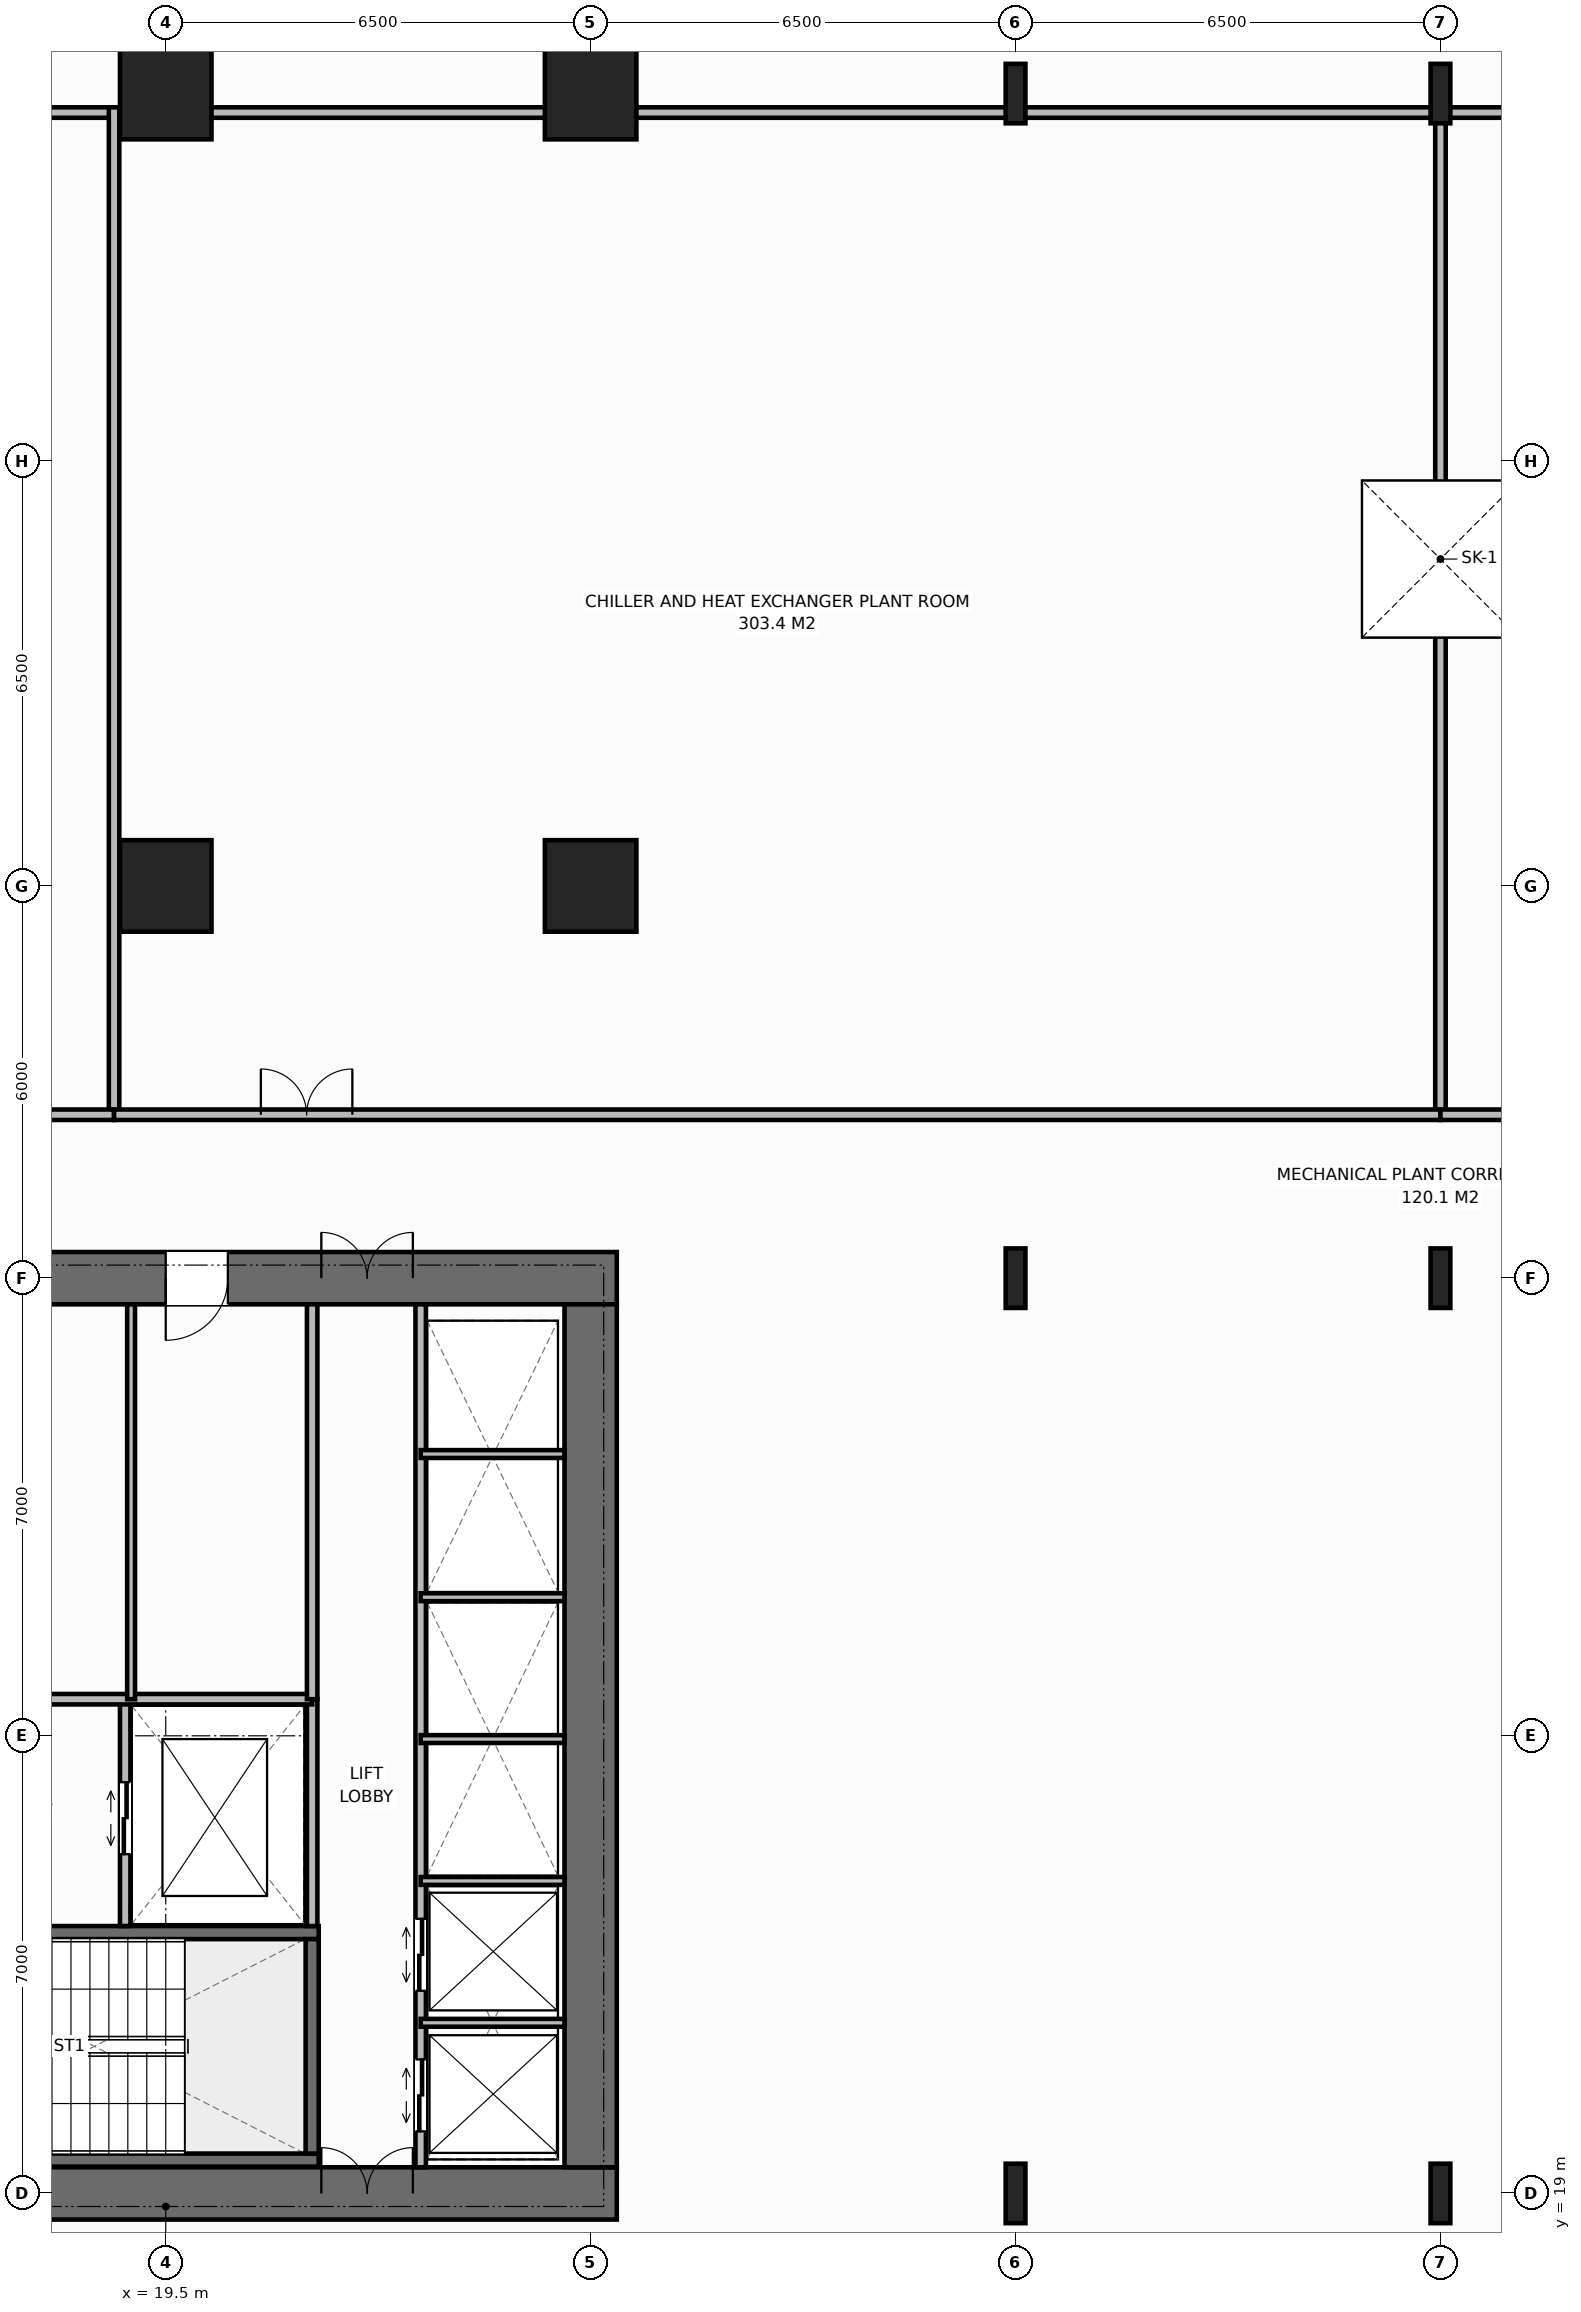
"""IFC4 building model, lengths in metres.
Left out: names, types, materials, properties, quantities, classifications, styles, units other than length and angle.
Written with IfcOpenShell. Run it as: python <this file> out.ifc"""

import sys

from ifc_helpers import new_model, si_unit, direction, frame, frame_2d, origin, origin_2d, place, context, subcontext, project, spatial, rectangle, i_section, extrude, element, fill, save


model = new_model("IFC4")
c1 = context("Model", 3, precision=1e-05, world=origin(), true_north=direction((0.0, 1.0)))
c2 = subcontext(c1, "Body", "Model", "MODEL_VIEW")
j1 = project(units=[si_unit("LENGTHUNIT", "METRE"), si_unit("PLANEANGLEUNIT", "RADIAN")], contexts=[c1])
p1 = place(None, origin())
s1 = spatial("IfcSite", under=j1, at=p1, CompositionType="ELEMENT")
p2 = place(p1, origin())
s2 = spatial("IfcBuilding", under=s1, at=p2, CompositionType="ELEMENT")
p3 = place(p2, frame((0.0, 0.0, 22.0)))
s3 = spatial("IfcBuildingStorey", under=s2, at=p3, CompositionType="ELEMENT", Elevation=22.0)
p4 = place(p3, frame((12.6, 19.0, 0.0), z_axis=(0.0, 0.0, 1.0), x_axis=(1.0, 0.0, 0.0)))
e1 = element("IfcWall", 1, at=p4, inside=s3, PredefinedType="SHEAR", context=c2, shape_type="SweptSolid", body=[
    extrude(rectangle(XDim=13.8, YDim=0.8, at=frame_2d((6.9, 0.0))), origin(), (0.0, 0.0, 1.0), 5.8),
])
p5 = place(p4, frame((9.28, 0.0, 0.0)))
e2 = element("IfcOpeningElement", 2, at=p5, cuts=e1, PredefinedType="OPENING", context=c2, shape_type="SweptSolid", body=[
    extrude(rectangle(XDim=1.4, YDim=2.2, at=frame_2d((0.7, 1.1))), frame((0.0, 0.41, 0.0), z_axis=(0.0, -1.0, 0.0), x_axis=(1.0, 0.0, 0.0)), (0.0, 0.0, 1.0), 0.82),
])
p6 = place(p3, frame((12.6, 33.0, 0.0), z_axis=(0.0, 0.0, 1.0), x_axis=(1.0, 0.0, 0.0)))
e3 = element("IfcWall", 3, at=p6, inside=s3, PredefinedType="SHEAR", context=c2, shape_type="SweptSolid", body=[
    extrude(rectangle(XDim=13.8, YDim=0.8, at=frame_2d((6.9, 0.0))), origin(), (0.0, 0.0, 1.0), 5.8),
])
p7 = place(p6, frame((1.3, 0.0, 0.0)))
e4 = element("IfcOpeningElement", 4, at=p7, cuts=e3, PredefinedType="OPENING", context=c2, shape_type="SweptSolid", body=[
    extrude(rectangle(XDim=0.9, YDim=2.15, at=frame_2d((0.45, 1.075))), frame((0.0, 0.41, 0.0), z_axis=(0.0, -1.0, 0.0), x_axis=(1.0, 0.0, 0.0)), (0.0, 0.0, 1.0), 0.82),
])
p8 = place(p6, frame((3.9, 0.0, 0.0)))
e5 = element("IfcOpeningElement", 5, at=p8, cuts=e3, PredefinedType="OPENING", context=c2, shape_type="SweptSolid", body=[
    extrude(rectangle(XDim=0.95, YDim=2.15, at=frame_2d((0.475, 1.075))), frame((0.0, 0.41, 0.0), z_axis=(0.0, -1.0, 0.0), x_axis=(1.0, 0.0, 0.0)), (0.0, 0.0, 1.0), 0.82),
])
p9 = place(p6, frame((6.9, 0.0, 0.0)))
e6 = element("IfcOpeningElement", 6, at=p9, cuts=e3, PredefinedType="OPENING", context=c2, shape_type="SweptSolid", body=[
    extrude(rectangle(XDim=0.95, YDim=2.15, at=frame_2d((0.475, 1.075))), frame((0.0, 0.41, 0.0), z_axis=(0.0, -1.0, 0.0), x_axis=(1.0, 0.0, 0.0)), (0.0, 0.0, 1.0), 0.82),
])
p10 = place(p6, frame((9.28, 0.0, 0.0)))
e7 = element("IfcOpeningElement", 7, at=p10, cuts=e3, PredefinedType="OPENING", context=c2, shape_type="SweptSolid", body=[
    extrude(rectangle(XDim=1.4, YDim=2.2, at=frame_2d((0.7, 1.1))), frame((0.0, 0.41, 0.0), z_axis=(0.0, -1.0, 0.0), x_axis=(1.0, 0.0, 0.0)), (0.0, 0.0, 1.0), 0.82),
])
p11 = place(p3, frame((26.0, 19.4, 0.0), z_axis=(0.0, 0.0, 1.0), x_axis=(0.0, 1.0, 0.0)))
e8 = element("IfcWall", 8, at=p11, inside=s3, PredefinedType="SHEAR", context=c2, shape_type="SweptSolid", body=[
    extrude(rectangle(XDim=13.2, YDim=0.8, at=frame_2d((6.6, 0.0))), origin(), (0.0, 0.0, 1.0), 5.8),
])
p12 = place(p3, frame((13.41, 19.51, 0.0), z_axis=(0.0, 0.0, 1.0), x_axis=(1.0, 0.0, 0.0)))
e9 = element("IfcWall", 9, at=p12, inside=s3, PredefinedType="SHEAR", context=c2, shape_type="SweptSolid", body=[
    extrude(rectangle(XDim=8.43, YDim=0.2, at=frame_2d((4.215, 0.0))), origin(), (0.0, 0.0, 1.0), 5.8),
])
p13 = place(p3, frame((13.41, 22.99, 0.0), z_axis=(0.0, 0.0, 1.0), x_axis=(1.0, 0.0, 0.0)))
e10 = element("IfcWall", 10, at=p13, inside=s3, PredefinedType="SHEAR", context=c2, shape_type="SweptSolid", body=[
    extrude(rectangle(XDim=8.43, YDim=0.2, at=frame_2d((4.215, 0.0))), origin(), (0.0, 0.0, 1.0), 5.8),
])
p14 = place(p13, frame((0.45, 0.0, 0.0)))
e11 = element("IfcOpeningElement", 11, at=p14, cuts=e10, PredefinedType="OPENING", context=c2, shape_type="SweptSolid", body=[
    extrude(rectangle(XDim=1.0, YDim=2.15, at=frame_2d((0.5, 1.075))), frame((0.0, 0.11, 0.0), z_axis=(0.0, -1.0, 0.0), x_axis=(1.0, 0.0, 0.0)), (0.0, 0.0, 1.0), 0.22),
])
p15 = place(p3, frame((21.74, 19.61, 0.0), z_axis=(0.0, 0.0, 1.0), x_axis=(0.0, 1.0, 0.0)))
e12 = element("IfcWall", 12, at=p15, inside=s3, PredefinedType="SHEAR", context=c2, shape_type="SweptSolid", body=[
    extrude(rectangle(XDim=3.28, YDim=0.2, at=frame_2d((1.64, 0.0))), origin(), (0.0, 0.0, 1.0), 5.8),
])
for number, where, z_axis, x_axis in (
    (13, (19.5, 39.0, 0.0), (0.0, 0.0, 1.0), (1.0, 0.0, 0.0)),
    (14, (26.0, 39.0, 0.0), (0.0, 0.0, 1.0), (1.0, 0.0, 0.0)),
    (15, (19.5, 51.12, 0.0), (0.0, 0.0, 1.0), (1.0, 0.0, 0.0)),
    (16, (26.0, 51.12, 0.0), (0.0, 0.0, 1.0), (1.0, 0.0, 0.0)),
):
    element("IfcColumn", number, at=place(p3, frame(where, z_axis=z_axis, x_axis=x_axis)), inside=s3, PredefinedType="COLUMN", context=c2, shape_type="SweptSolid", body=[
        extrude(rectangle(XDim=1.4, YDim=1.4, at=origin_2d()), origin(), (0.0, 0.0, 1.0), 5.8),
    ])
for number, where, z_axis, x_axis in (
    (17, (32.5, 19.0, 0.0), (0.0, 0.0, 1.0), (1.0, 0.0, 0.0)),
    (18, (39.0, 19.0, 0.0), (0.0, 0.0, 1.0), (1.0, 0.0, 0.0)),
    (19, (32.5, 33.0, 0.0), (0.0, 0.0, 1.0), (1.0, 0.0, 0.0)),
    (20, (39.0, 33.0, 0.0), (0.0, 0.0, 1.0), (1.0, 0.0, 0.0)),
    (21, (32.5, 51.12, 0.0), (0.0, 0.0, 1.0), (1.0, 0.0, 0.0)),
    (22, (39.0, 51.12, 0.0), (0.0, 0.0, 1.0), (1.0, 0.0, 0.0)),
):
    element("IfcColumn", number, at=place(p3, frame(where, z_axis=z_axis, x_axis=x_axis)), inside=s3, PredefinedType="COLUMN", context=c2, shape_type="SweptSolid", body=[
        extrude(i_section(OverallWidth=0.302, OverallDepth=0.91, WebThickness=0.021, FlangeThickness=0.04, at=origin_2d()), origin(), (0.0, 0.0, 1.0), 5.8),
    ])
p16 = place(p3, frame((21.74, 23.09, 0.0), z_axis=(0.0, 0.0, 1.0), x_axis=(0.0, 1.0, 0.0)))
e23 = element("IfcWall", 23, at=p16, inside=s3, PredefinedType="STANDARD", context=c2, shape_type="SweptSolid", body=[
    extrude(rectangle(XDim=3.47, YDim=0.16, at=frame_2d((1.735, 0.0))), origin(), (0.0, 0.0, 1.0), 5.55),
])
p17 = place(p3, frame((18.88, 23.09, 0.0), z_axis=(0.0, 0.0, 1.0), x_axis=(0.0, 1.0, 0.0)))
e24 = element("IfcWall", 24, at=p17, inside=s3, PredefinedType="STANDARD", context=c2, shape_type="SweptSolid", body=[
    extrude(rectangle(XDim=3.47, YDim=0.16, at=frame_2d((1.735, 0.0))), origin(), (0.0, 0.0, 1.0), 5.55),
])
p18 = place(p17, frame((1.1, 0.0, 0.0)))
e25 = element("IfcOpeningElement", 25, at=p18, cuts=e24, PredefinedType="OPENING", context=c2, shape_type="SweptSolid", body=[
    extrude(rectangle(XDim=1.1, YDim=2.2, at=frame_2d((0.55, 1.1))), frame((0.0, 0.09, 0.0), z_axis=(0.0, -1.0, 0.0), x_axis=(1.0, 0.0, 0.0)), (0.0, 0.0, 1.0), 0.18),
])
p19 = place(p3, frame((13.4, 26.56, 0.0), z_axis=(0.0, 0.0, 1.0), x_axis=(1.0, 0.0, 0.0)))
e26 = element("IfcWall", 26, at=p19, inside=s3, PredefinedType="STANDARD", context=c2, shape_type="SweptSolid", body=[
    extrude(rectangle(XDim=8.34, YDim=0.16, at=frame_2d((4.17, 0.0))), origin(), (0.0, 0.0, 1.0), 5.55),
])
p20 = place(p3, frame((18.97, 26.56, 0.0), z_axis=(0.0, 0.0, 1.0), x_axis=(0.0, 1.0, 0.0)))
e27 = element("IfcWall", 27, at=p20, inside=s3, PredefinedType="PARTITIONING", context=c2, shape_type="SweptSolid", body=[
    extrude(rectangle(XDim=6.04, YDim=0.12, at=frame_2d((3.02, 0.0))), origin(), (0.0, 0.0, 1.0), 5.55),
])
p21 = place(p3, frame((21.74, 26.56, 0.0), z_axis=(0.0, 0.0, 1.0), x_axis=(0.0, 1.0, 0.0)))
e28 = element("IfcWall", 28, at=p21, inside=s3, PredefinedType="STANDARD", context=c2, shape_type="SweptSolid", body=[
    extrude(rectangle(XDim=6.04, YDim=0.16, at=frame_2d((3.02, 0.0))), origin(), (0.0, 0.0, 1.0), 5.55),
])
p22 = place(p3, frame((23.4, 19.4, 0.0), z_axis=(0.0, 0.0, 1.0), x_axis=(0.0, 1.0, 0.0)))
e29 = element("IfcWall", 29, at=p22, inside=s3, PredefinedType="STANDARD", context=c2, shape_type="SweptSolid", body=[
    extrude(rectangle(XDim=13.2, YDim=0.16, at=frame_2d((6.6, 0.0))), origin(), (0.0, 0.0, 1.0), 5.55),
])
p23 = place(p22, frame((0.55, 0.0, 0.0)))
e30 = element("IfcOpeningElement", 30, at=p23, cuts=e29, PredefinedType="OPENING", context=c2, shape_type="SweptSolid", body=[
    extrude(rectangle(XDim=1.1, YDim=2.2, at=frame_2d((0.55, 1.1))), frame((0.0, 0.09, 0.0), z_axis=(0.0, -1.0, 0.0), x_axis=(1.0, 0.0, 0.0)), (0.0, 0.0, 1.0), 0.18),
])
p24 = place(p22, frame((2.7, 0.0, 0.0)))
e31 = element("IfcOpeningElement", 31, at=p24, cuts=e29, PredefinedType="OPENING", context=c2, shape_type="SweptSolid", body=[
    extrude(rectangle(XDim=1.1, YDim=2.2, at=frame_2d((0.55, 1.1))), frame((0.0, 0.09, 0.0), z_axis=(0.0, -1.0, 0.0), x_axis=(1.0, 0.0, 0.0)), (0.0, 0.0, 1.0), 0.18),
])
for number, where, z_axis, x_axis in (
    (32, (23.4, 21.61, 0.0), (0.0, 0.0, 1.0), (1.0, 0.0, 0.0)),
    (33, (23.4, 23.78, 0.0), (0.0, 0.0, 1.0), (1.0, 0.0, 0.0)),
    (34, (23.4, 25.95, 0.0), (0.0, 0.0, 1.0), (1.0, 0.0, 0.0)),
    (35, (23.4, 28.12, 0.0), (0.0, 0.0, 1.0), (1.0, 0.0, 0.0)),
    (36, (23.4, 30.31, 0.0), (0.0, 0.0, 1.0), (1.0, 0.0, 0.0)),
):
    element("IfcWall", number, at=place(p3, frame(where, z_axis=z_axis, x_axis=x_axis)), inside=s3, PredefinedType="PARTITIONING", context=c2, shape_type="SweptSolid", body=[
        extrude(rectangle(XDim=2.2, YDim=0.12, at=frame_2d((1.1, 0.0))), origin(), (0.0, 0.0, 1.0), 5.55),
    ])
p25 = place(p3, frame((-0.02, 50.83, 0.0), z_axis=(0.0, 0.0, 1.0), x_axis=(1.0, 0.0, 0.0)))
e37 = element("IfcWall", 37, at=p25, inside=s3, PredefinedType="STANDARD", context=c2, shape_type="SweptSolid", body=[
    extrude(rectangle(XDim=78.04, YDim=0.16, at=frame_2d((39.02, 0.0))), origin(), (0.0, 0.0, 1.0), 3.15),
])
p26 = place(p3, frame((18.71, 35.5, 0.0), z_axis=(0.0, 0.0, 1.0), x_axis=(0.0, 1.0, 0.0)))
e38 = element("IfcWall", 38, at=p26, inside=s3, PredefinedType="STANDARD", context=c2, shape_type="SweptSolid", body=[
    extrude(rectangle(XDim=15.41, YDim=0.16, at=frame_2d((7.705, 0.0))), origin(), (0.0, 0.0, 1.0), 5.55),
])
p27 = place(p3, frame((-0.18, 35.5, 0.0), z_axis=(0.0, 0.0, 1.0), x_axis=(1.0, 0.0, 0.0)))
e39 = element("IfcWall", 39, at=p27, inside=s3, PredefinedType="STANDARD", context=c2, shape_type="SweptSolid", body=[
    extrude(rectangle(XDim=18.89, YDim=0.16, at=frame_2d((9.445, 0.0))), origin(), (0.0, 0.0, 1.0), 5.55),
])
p28 = place(p27, frame((14.035, 0.0, 0.0)))
e40 = element("IfcOpeningElement", 40, at=p28, cuts=e39, PredefinedType="OPENING", context=c2, shape_type="SweptSolid", body=[
    extrude(rectangle(XDim=1.4, YDim=2.2, at=frame_2d((0.7, 1.1))), frame((0.0, 0.09, 0.0), z_axis=(0.0, -1.0, 0.0), x_axis=(1.0, 0.0, 0.0)), (0.0, 0.0, 1.0), 0.18),
])
p29 = place(p3, frame((39.0, 35.5, 0.0), z_axis=(0.0, 0.0, 1.0), x_axis=(0.0, 1.0, 0.0)))
e41 = element("IfcWall", 41, at=p29, inside=s3, PredefinedType="STANDARD", context=c2, shape_type="SweptSolid", body=[
    extrude(rectangle(XDim=15.41, YDim=0.16, at=frame_2d((7.705, 0.0))), origin(), (0.0, 0.0, 1.0), 4.9),
])
p30 = place(p3, frame((18.71, 35.5, 0.0), z_axis=(0.0, 0.0, 1.0), x_axis=(1.0, 0.0, 0.0)))
e42 = element("IfcWall", 42, at=p30, inside=s3, PredefinedType="STANDARD", context=c2, shape_type="SweptSolid", body=[
    extrude(rectangle(XDim=20.29, YDim=0.16, at=frame_2d((10.145, 0.0))), origin(), (0.0, 0.0, 1.0), 5.55),
])
p31 = place(p30, frame((2.245, 0.0, 0.0)))
e43 = element("IfcOpeningElement", 43, at=p31, cuts=e42, PredefinedType="OPENING", context=c2, shape_type="SweptSolid", body=[
    extrude(rectangle(XDim=1.4, YDim=2.2, at=frame_2d((0.7, 1.1))), frame((0.0, 0.09, 0.0), z_axis=(0.0, -1.0, 0.0), x_axis=(1.0, 0.0, 0.0)), (0.0, 0.0, 1.0), 0.18),
])
p32 = place(p3, frame((39.0, 35.5, 0.0), z_axis=(0.0, 0.0, 1.0), x_axis=(1.0, 0.0, 0.0)))
e44 = element("IfcWall", 44, at=p32, inside=s3, PredefinedType="STANDARD", context=c2, shape_type="SweptSolid", body=[
    extrude(rectangle(XDim=20.29, YDim=0.16, at=frame_2d((10.145, 0.0))), origin(), (0.0, 0.0, 1.0), 5.55),
])
p33 = place(p32, frame((16.645, 0.0, 0.0)))
e45 = element("IfcOpeningElement", 45, at=p33, cuts=e44, PredefinedType="OPENING", context=c2, shape_type="SweptSolid", body=[
    extrude(rectangle(XDim=1.4, YDim=2.2, at=frame_2d((0.7, 1.1))), frame((0.0, 0.09, 0.0), z_axis=(0.0, -1.0, 0.0), x_axis=(1.0, 0.0, 0.0)), (0.0, 0.0, 1.0), 0.18),
])
p34 = place(p3, frame((0.0, 0.0, -0.6)))
p35 = place(p34, frame((39.0, 44.0, 0.0)))
p36 = place(p35, frame((0.0, 0.0, 0.55)))
e46 = element("IfcWindow", 46, at=p36, inside=s3, PartitioningType="SINGLE_PANEL", PredefinedType="SKYLIGHT", context=c2, shape_type="SweptSolid", body=[
    extrude(rectangle(XDim=2.4, YDim=2.4, at=origin_2d()), origin(), (0.0, 0.0, 1.0), 0.05),
])
p37 = place(p18, origin())
e47 = element("IfcDoor", 47, at=p37, inside=s3, OperationType="DOUBLE_DOOR_SLIDING", PredefinedType="DOOR", context=c2, shape_type="SweptSolid", body=[
    extrude(rectangle(XDim=1.1, YDim=2.2, at=frame_2d((0.55, 1.1))), frame((0.0, 0.025, 0.0), z_axis=(0.0, -1.0, 0.0), x_axis=(1.0, 0.0, 0.0)), (0.0, 0.0, 1.0), 0.05),
])
fill(e25, e47)
p38 = place(p9, origin())
e48 = element("IfcDoor", 48, at=p38, inside=s3, OperationType="SINGLE_SWING_RIGHT", PredefinedType="DOOR", context=c2, shape_type="SweptSolid", body=[
    extrude(rectangle(XDim=0.95, YDim=2.15, at=frame_2d((0.475, 1.075))), frame((0.0, -0.075, 0.0), z_axis=(0.0, -1.0, 0.0), x_axis=(1.0, 0.0, 0.0)), (0.0, 0.0, 1.0), 0.05),
])
fill(e6, e48)
p39 = place(p5, origin())
e49 = element("IfcDoor", 49, at=p39, inside=s3, OperationType="DOUBLE_DOOR_SINGLE_SWING", PredefinedType="DOOR", context=c2, shape_type="SweptSolid", body=[
    extrude(rectangle(XDim=1.4, YDim=2.2, at=frame_2d((0.7, 1.1))), frame((0.0, 0.125, 0.0), z_axis=(0.0, -1.0, 0.0), x_axis=(1.0, 0.0, 0.0)), (0.0, 0.0, 1.0), 0.05),
])
fill(e2, e49)
p40 = place(p10, origin())
e50 = element("IfcDoor", 50, at=p40, inside=s3, OperationType="DOUBLE_DOOR_SINGLE_SWING", PredefinedType="DOOR", context=c2, shape_type="SweptSolid", body=[
    extrude(rectangle(XDim=1.4, YDim=2.2, at=frame_2d((0.7, 1.1))), frame((0.0, -0.075, 0.0), z_axis=(0.0, -1.0, 0.0), x_axis=(1.0, 0.0, 0.0)), (0.0, 0.0, 1.0), 0.05),
])
fill(e7, e50)
p41 = place(p23, origin())
e51 = element("IfcDoor", 51, at=p41, inside=s3, OperationType="DOUBLE_DOOR_SLIDING", PredefinedType="DOOR", context=c2, shape_type="SweptSolid", body=[
    extrude(rectangle(XDim=1.1, YDim=2.2, at=frame_2d((0.55, 1.1))), frame((0.0, 0.025, 0.0), z_axis=(0.0, -1.0, 0.0), x_axis=(1.0, 0.0, 0.0)), (0.0, 0.0, 1.0), 0.05),
])
fill(e30, e51)
p42 = place(p24, origin())
e52 = element("IfcDoor", 52, at=p42, inside=s3, OperationType="DOUBLE_DOOR_SLIDING", PredefinedType="DOOR", context=c2, shape_type="SweptSolid", body=[
    extrude(rectangle(XDim=1.1, YDim=2.2, at=frame_2d((0.55, 1.1))), frame((0.0, 0.025, 0.0), z_axis=(0.0, -1.0, 0.0), x_axis=(1.0, 0.0, 0.0)), (0.0, 0.0, 1.0), 0.05),
])
fill(e31, e52)
p43 = place(p31, origin())
e53 = element("IfcDoor", 53, at=p43, inside=s3, OperationType="DOUBLE_DOOR_SINGLE_SWING", PredefinedType="DOOR", context=c2, shape_type="SweptSolid", body=[
    extrude(rectangle(XDim=1.4, YDim=2.2, at=frame_2d((0.7, 1.1))), frame((0.0, 0.025, 0.0), z_axis=(0.0, -1.0, 0.0), x_axis=(1.0, 0.0, 0.0)), (0.0, 0.0, 1.0), 0.05),
])
fill(e43, e53)
save(model, sys.argv[1])
